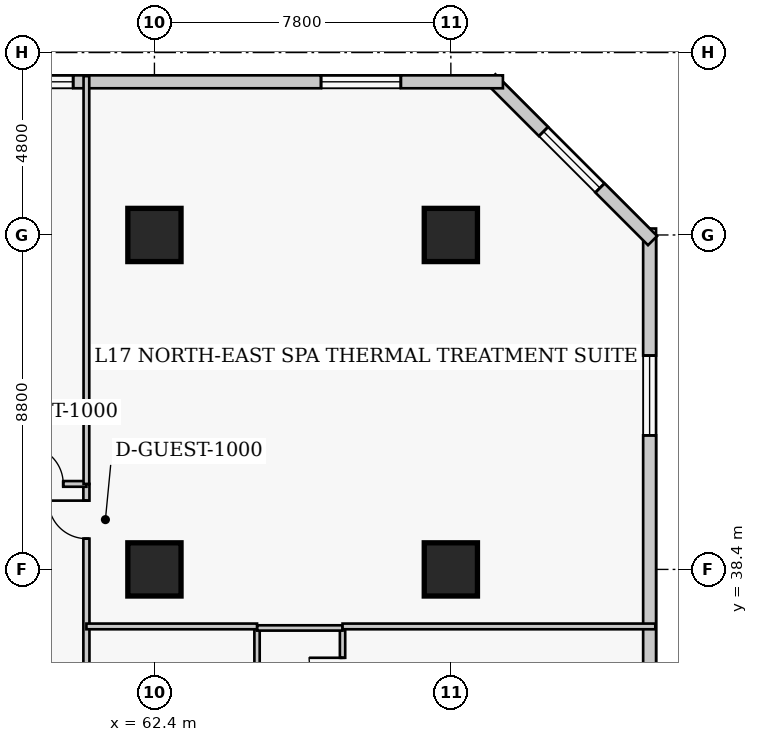
"""IFC4 building model, lengths in metres.
Left out: names, types, materials, properties, quantities, classifications, styles, units other than length and angle.
Written with IfcOpenShell. Run it as: python <this file> out.ifc"""

import sys

from ifc_helpers import new_model, si_unit, direction, frame, frame_2d, origin, origin_2d, place, context, subcontext, project, spatial, rectangle, extrude, element, fill, save


model = new_model("IFC4")
c1 = context("Model", 3, precision=1e-05, world=origin(), true_north=direction((0.0, 1.0)))
c2 = subcontext(c1, "Body", "Model", "MODEL_VIEW")
j1 = project(units=[si_unit("LENGTHUNIT", "METRE"), si_unit("PLANEANGLEUNIT", "RADIAN")], contexts=[c1])
p1 = place(None, origin())
s1 = spatial("IfcSite", under=j1, at=p1, CompositionType="ELEMENT")
p2 = place(p1, origin())
s2 = spatial("IfcBuilding", under=s1, at=p2, CompositionType="ELEMENT")
p3 = place(p2, frame((0.0, 0.0, 71.6)))
s3 = spatial("IfcBuildingStorey", under=s2, at=p3, CompositionType="ELEMENT", Elevation=71.6)
for number, where, z_axis, x_axis in (
    (1, (62.4, 38.4, 0.0), (0.0, 0.0, 1.0), (1.0, 0.0, 0.0)),
    (2, (62.4, 47.2, 0.0), (0.0, 0.0, 1.0), (1.0, 0.0, 0.0)),
    (3, (70.2, 38.4, 0.0), (0.0, 0.0, 1.0), (1.0, 0.0, 0.0)),
    (4, (70.2, 47.2, 0.0), (0.0, 0.0, 1.0), (1.0, 0.0, 0.0)),
):
    element("IfcColumn", number, at=place(p3, frame(where, z_axis=z_axis, x_axis=x_axis)), inside=s3, PredefinedType="COLUMN", context=c2, shape_type="SweptSolid", body=[
        extrude(rectangle(XDim=1.4, YDim=1.4, at=origin_2d()), origin(), (0.0, 0.0, 1.0), 3.8),
    ])
p4 = place(p3, frame((75.43, 12.23, 0.0), z_axis=(0.0, 0.0, 1.0), x_axis=(0.0, 1.0, 0.0)))
e5 = element("IfcWall", 5, at=p4, inside=s3, PredefinedType="SOLIDWALL", context=c2, shape_type="SweptSolid", body=[
    extrude(rectangle(XDim=35.14, YDim=0.34, at=frame_2d((17.57, 0.0))), origin(), (0.0, 0.0, 1.0), 3.42),
])
p5 = place(p4, frame((3.343, 0.0, 0.85)))
e6 = element("IfcOpeningElement", 6, at=p5, cuts=e5, PredefinedType="OPENING", context=c2, shape_type="SweptSolid", body=[
    extrude(rectangle(XDim=2.1, YDim=1.85, at=frame_2d((1.05, 0.925))), frame((0.0, 0.18, 0.0), z_axis=(0.0, -1.0, 0.0), x_axis=(1.0, 0.0, 0.0)), (0.0, 0.0, 1.0), 0.36),
])
p6 = place(p4, frame((12.127, 0.0, 0.85)))
e7 = element("IfcOpeningElement", 7, at=p6, cuts=e5, PredefinedType="OPENING", context=c2, shape_type="SweptSolid", body=[
    extrude(rectangle(XDim=2.1, YDim=1.85, at=frame_2d((1.05, 0.925))), frame((0.0, 0.18, 0.0), z_axis=(0.0, -1.0, 0.0), x_axis=(1.0, 0.0, 0.0)), (0.0, 0.0, 1.0), 0.36),
])
p7 = place(p4, frame((20.913, 0.0, 0.85)))
e8 = element("IfcOpeningElement", 8, at=p7, cuts=e5, PredefinedType="OPENING", context=c2, shape_type="SweptSolid", body=[
    extrude(rectangle(XDim=2.1, YDim=1.85, at=frame_2d((1.05, 0.925))), frame((0.0, 0.18, 0.0), z_axis=(0.0, -1.0, 0.0), x_axis=(1.0, 0.0, 0.0)), (0.0, 0.0, 1.0), 0.36),
])
p8 = place(p4, frame((29.698, 0.0, 0.85)))
e9 = element("IfcOpeningElement", 9, at=p8, cuts=e5, PredefinedType="OPENING", context=c2, shape_type="SweptSolid", body=[
    extrude(rectangle(XDim=2.1, YDim=1.85, at=frame_2d((1.05, 0.925))), frame((0.0, 0.18, 0.0), z_axis=(0.0, -1.0, 0.0), x_axis=(1.0, 0.0, 0.0)), (0.0, 0.0, 1.0), 0.36),
])
p9 = place(p3, frame((75.508, 47.052, 0.0), z_axis=(0.0, 0.0, 1.0), x_axis=(-0.707106781187, 0.707106781187, 0.0)))
e10 = element("IfcWall", 10, at=p9, inside=s3, PredefinedType="SOLIDWALL", context=c2, shape_type="SweptSolid", body=[
    extrude(rectangle(XDim=6.02, YDim=0.34, at=frame_2d((3.01, 0.0))), origin(), (0.0, 0.0, 1.0), 3.42),
])
p10 = place(p9, frame((1.96, 0.0, 0.85)))
e11 = element("IfcOpeningElement", 11, at=p10, cuts=e10, PredefinedType="OPENING", context=c2, shape_type="SweptSolid", body=[
    extrude(rectangle(XDim=2.1, YDim=1.85, at=frame_2d((1.05, 0.925))), frame((0.0, 0.18, 0.0), z_axis=(0.0, -1.0, 0.0), x_axis=(1.0, 0.0, 0.0)), (0.0, 0.0, 1.0), 0.36),
])
p11 = place(p3, frame((71.57, 51.23, 0.0), z_axis=(0.0, 0.0, 1.0), x_axis=(-1.0, 0.0, 0.0)))
e12 = element("IfcWall", 12, at=p11, inside=s3, PredefinedType="SOLIDWALL", context=c2, shape_type="SweptSolid", body=[
    extrude(rectangle(XDim=29.89, YDim=0.34, at=frame_2d((14.945, 0.0))), origin(), (0.0, 0.0, 1.0), 3.42),
])
p12 = place(p11, frame((2.686, 0.0, 0.85)))
e13 = element("IfcOpeningElement", 13, at=p12, cuts=e12, PredefinedType="OPENING", context=c2, shape_type="SweptSolid", body=[
    extrude(rectangle(XDim=2.1, YDim=1.85, at=frame_2d((1.05, 0.925))), frame((0.0, 0.18, 0.0), z_axis=(0.0, -1.0, 0.0), x_axis=(1.0, 0.0, 0.0)), (0.0, 0.0, 1.0), 0.36),
])
p13 = place(p11, frame((11.309, 0.0, 0.85)))
e14 = element("IfcOpeningElement", 14, at=p13, cuts=e12, PredefinedType="OPENING", context=c2, shape_type="SweptSolid", body=[
    extrude(rectangle(XDim=2.1, YDim=1.85, at=frame_2d((1.05, 0.925))), frame((0.0, 0.18, 0.0), z_axis=(0.0, -1.0, 0.0), x_axis=(1.0, 0.0, 0.0)), (0.0, 0.0, 1.0), 0.36),
])
p14 = place(p11, frame((17.631, 0.0, 0.85)))
e15 = element("IfcOpeningElement", 15, at=p14, cuts=e12, PredefinedType="OPENING", context=c2, shape_type="SweptSolid", body=[
    extrude(rectangle(XDim=2.1, YDim=1.85, at=frame_2d((1.05, 0.925))), frame((0.0, 0.18, 0.0), z_axis=(0.0, -1.0, 0.0), x_axis=(1.0, 0.0, 0.0)), (0.0, 0.0, 1.0), 0.36),
])
p15 = place(p11, frame((25.104, 0.0, 0.85)))
e16 = element("IfcOpeningElement", 16, at=p15, cuts=e12, PredefinedType="OPENING", context=c2, shape_type="SweptSolid", body=[
    extrude(rectangle(XDim=2.1, YDim=1.85, at=frame_2d((1.05, 0.925))), frame((0.0, 0.18, 0.0), z_axis=(0.0, -1.0, 0.0), x_axis=(1.0, 0.0, 0.0)), (0.0, 0.0, 1.0), 0.36),
])
p16 = place(p3, frame((60.61, 10.25, 0.0), z_axis=(0.0, 0.0, 1.0), x_axis=(0.0, 1.0, 0.0)))
e17 = element("IfcWall", 17, at=p16, inside=s3, PredefinedType="PARTITIONING", context=c2, shape_type="SweptSolid", body=[
    extrude(rectangle(XDim=30.4, YDim=0.16, at=frame_2d((15.2, 0.0))), origin(), (0.0, 0.0, 1.0), 3.42),
])
p17 = place(p16, frame((4.4, 0.0, 0.0)))
e18 = element("IfcOpeningElement", 18, at=p17, cuts=e17, PredefinedType="OPENING", context=c2, shape_type="SweptSolid", body=[
    extrude(rectangle(XDim=0.95, YDim=2.1, at=frame_2d((0.475, 1.05))), frame((0.0, 0.09, 0.0), z_axis=(0.0, -1.0, 0.0), x_axis=(1.0, 0.0, 0.0)), (0.0, 0.0, 1.0), 0.18),
])
p18 = place(p16, frame((13.675, 0.0, 0.0)))
e19 = element("IfcOpeningElement", 19, at=p18, cuts=e17, PredefinedType="OPENING", context=c2, shape_type="SweptSolid", body=[
    extrude(rectangle(XDim=0.95, YDim=2.1, at=frame_2d((0.475, 1.05))), frame((0.0, 0.09, 0.0), z_axis=(0.0, -1.0, 0.0), x_axis=(1.0, 0.0, 0.0)), (0.0, 0.0, 1.0), 0.18),
])
p19 = place(p16, frame((22.125, 0.0, 0.0)))
e20 = element("IfcOpeningElement", 20, at=p19, cuts=e17, PredefinedType="OPENING", context=c2, shape_type="SweptSolid", body=[
    extrude(rectangle(XDim=0.95, YDim=2.1, at=frame_2d((0.475, 1.05))), frame((0.0, 0.09, 0.0), z_axis=(0.0, -1.0, 0.0), x_axis=(1.0, 0.0, 0.0)), (0.0, 0.0, 1.0), 0.18),
])
p20 = place(p16, frame((28.96, 0.0, 0.0)))
e21 = element("IfcOpeningElement", 21, at=p20, cuts=e17, PredefinedType="OPENING", context=c2, shape_type="SweptSolid", body=[
    extrude(rectangle(XDim=1.0, YDim=2.15, at=frame_2d((0.5, 1.075))), frame((0.0, 0.09, 0.0), z_axis=(0.0, -1.0, 0.0), x_axis=(1.0, 0.0, 0.0)), (0.0, 0.0, 1.0), 0.18),
])
p21 = place(p3, frame((56.8, 40.65, 0.0), z_axis=(0.0, 0.0, 1.0), x_axis=(1.0, 0.0, 0.0)))
e22 = element("IfcWall", 22, at=p21, inside=s3, PredefinedType="PARTITIONING", context=c2, shape_type="SweptSolid", body=[
    extrude(rectangle(XDim=3.81, YDim=0.15, at=frame_2d((1.905, 0.0))), origin(), (0.0, 0.0, 1.0), 3.42),
])
p22 = place(p21, frame((2.2, 0.0, 0.0)))
e23 = element("IfcOpeningElement", 23, at=p22, cuts=e22, PredefinedType="OPENING", context=c2, shape_type="SweptSolid", body=[
    extrude(rectangle(XDim=1.0, YDim=2.15, at=frame_2d((0.5, 1.075))), frame((0.0, 0.085, 0.0), z_axis=(0.0, -1.0, 0.0), x_axis=(1.0, 0.0, 0.0)), (0.0, 0.0, 1.0), 0.17),
])
p23 = place(p3, frame((60.61, 40.65, 0.0), z_axis=(0.0, 0.0, 1.0), x_axis=(0.0, 1.0, 0.0)))
e24 = element("IfcWall", 24, at=p23, inside=s3, PredefinedType="PARTITIONING", context=c2, shape_type="SweptSolid", body=[
    extrude(rectangle(XDim=10.73, YDim=0.15, at=frame_2d((5.365, 0.0))), origin(), (0.0, 0.0, 1.0), 3.42),
])
p24 = place(p3, frame((65.1, 34.41, 0.0), z_axis=(0.0, 0.0, 1.0), x_axis=(0.0, 1.0, 0.0)))
e25 = element("IfcWall", 25, at=p24, inside=s3, PredefinedType="PLUMBINGWALL", context=c2, shape_type="SweptSolid", body=[
    extrude(rectangle(XDim=2.45, YDim=0.14, at=frame_2d((1.225, 0.0))), origin(), (0.0, 0.0, 1.0), 3.42),
])
p25 = place(p3, frame((67.35, 34.41, 0.0), z_axis=(0.0, 0.0, 1.0), x_axis=(0.0, 1.0, 0.0)))
e26 = element("IfcWall", 26, at=p25, inside=s3, PredefinedType="PLUMBINGWALL", context=c2, shape_type="SweptSolid", body=[
    extrude(rectangle(XDim=2.45, YDim=0.14, at=frame_2d((1.225, 0.0))), origin(), (0.0, 0.0, 1.0), 3.42),
])
p26 = place(p25, frame((0.785, 0.0, 0.0)))
e27 = element("IfcOpeningElement", 27, at=p26, cuts=e26, PredefinedType="OPENING", context=c2, shape_type="SweptSolid", body=[
    extrude(rectangle(XDim=0.88, YDim=2.05, at=frame_2d((0.44, 1.025))), frame((0.0, 0.08, 0.0), z_axis=(0.0, -1.0, 0.0), x_axis=(1.0, 0.0, 0.0)), (0.0, 0.0, 1.0), 0.16),
])
p27 = place(p3, frame((65.1, 36.86, 0.0), z_axis=(0.0, 0.0, 1.0), x_axis=(1.0, 0.0, 0.0)))
e28 = element("IfcWall", 28, at=p27, inside=s3, PredefinedType="PLUMBINGWALL", context=c2, shape_type="SweptSolid", body=[
    extrude(rectangle(XDim=2.25, YDim=0.14, at=frame_2d((1.125, 0.0))), origin(), (0.0, 0.0, 1.0), 3.42),
])
p28 = place(p3, frame((60.61, 36.9, 0.0), z_axis=(0.0, 0.0, 1.0), x_axis=(1.0, 0.0, 0.0)))
e29 = element("IfcWall", 29, at=p28, inside=s3, PredefinedType="PARTITIONING", context=c2, shape_type="SweptSolid", body=[
    extrude(rectangle(XDim=4.49, YDim=0.15, at=frame_2d((2.245, 0.0))), origin(), (0.0, 0.0, 1.0), 3.42),
])
p29 = place(p3, frame((67.35, 36.9, 0.0), z_axis=(0.0, 0.0, 1.0), x_axis=(1.0, 0.0, 0.0)))
e30 = element("IfcWall", 30, at=p29, inside=s3, PredefinedType="PARTITIONING", context=c2, shape_type="SweptSolid", body=[
    extrude(rectangle(XDim=8.23, YDim=0.15, at=frame_2d((4.115, 0.0))), origin(), (0.0, 0.0, 1.0), 3.42),
])
p30 = place(p8, origin())
e31 = element("IfcWindow", 31, at=p30, inside=s3, PartitioningType="SINGLE_PANEL", PredefinedType="WINDOW", context=c2, shape_type="SweptSolid", body=[
    extrude(rectangle(XDim=2.1, YDim=1.85, at=frame_2d((1.05, 0.925))), frame((0.0, 0.03, 0.0), z_axis=(0.0, -1.0, 0.0), x_axis=(1.0, 0.0, 0.0)), (0.0, 0.0, 1.0), 0.06),
])
fill(e9, e31)
p31 = place(p10, origin())
e32 = element("IfcWindow", 32, at=p31, inside=s3, PartitioningType="SINGLE_PANEL", PredefinedType="WINDOW", context=c2, shape_type="SweptSolid", body=[
    extrude(rectangle(XDim=2.1, YDim=1.85, at=frame_2d((1.05, 0.925))), frame((0.0, 0.03, 0.0), z_axis=(0.0, -1.0, 0.0), x_axis=(1.0, 0.0, 0.0)), (0.0, 0.0, 1.0), 0.06),
])
fill(e11, e32)
p32 = place(p12, origin())
e33 = element("IfcWindow", 33, at=p32, inside=s3, PartitioningType="SINGLE_PANEL", PredefinedType="WINDOW", context=c2, shape_type="SweptSolid", body=[
    extrude(rectangle(XDim=2.1, YDim=1.85, at=frame_2d((1.05, 0.925))), frame((0.0, 0.03, 0.0), z_axis=(0.0, -1.0, 0.0), x_axis=(1.0, 0.0, 0.0)), (0.0, 0.0, 1.0), 0.06),
])
fill(e13, e33)
p33 = place(p13, origin())
e34 = element("IfcWindow", 34, at=p33, inside=s3, PartitioningType="SINGLE_PANEL", PredefinedType="WINDOW", context=c2, shape_type="SweptSolid", body=[
    extrude(rectangle(XDim=2.1, YDim=1.85, at=frame_2d((1.05, 0.925))), frame((0.0, 0.03, 0.0), z_axis=(0.0, -1.0, 0.0), x_axis=(1.0, 0.0, 0.0)), (0.0, 0.0, 1.0), 0.06),
])
fill(e14, e34)
p34 = place(p22, origin())
e35 = element("IfcDoor", 35, at=p34, inside=s3, OperationType="SINGLE_SWING_LEFT", PredefinedType="DOOR", context=c2, shape_type="SweptSolid", body=[
    extrude(rectangle(XDim=1.0, YDim=2.15, at=frame_2d((0.5, 1.075))), frame((0.0, 0.025, 0.0), z_axis=(0.0, -1.0, 0.0), x_axis=(1.0, 0.0, 0.0)), (0.0, 0.0, 1.0), 0.05),
])
fill(e23, e35)
p35 = place(p26, origin())
e36 = element("IfcDoor", 36, at=p35, inside=s3, OperationType="SINGLE_SWING_RIGHT", PredefinedType="DOOR", context=c2, shape_type="SweptSolid", body=[
    extrude(rectangle(XDim=0.88, YDim=2.05, at=frame_2d((0.44, 1.025))), frame((0.0, 0.025, 0.0), z_axis=(0.0, -1.0, 0.0), x_axis=(1.0, 0.0, 0.0)), (0.0, 0.0, 1.0), 0.05),
])
fill(e27, e36)
p36 = place(p20, origin())
e37 = element("IfcDoor", 37, at=p36, inside=s3, OperationType="SINGLE_SWING_RIGHT", PredefinedType="DOOR", context=c2, shape_type="SweptSolid", body=[
    extrude(rectangle(XDim=1.0, YDim=2.15, at=frame_2d((0.5, 1.075))), frame((0.0, 0.025, 0.0), z_axis=(0.0, -1.0, 0.0), x_axis=(1.0, 0.0, 0.0)), (0.0, 0.0, 1.0), 0.05),
])
fill(e21, e37)
save(model, sys.argv[1])
